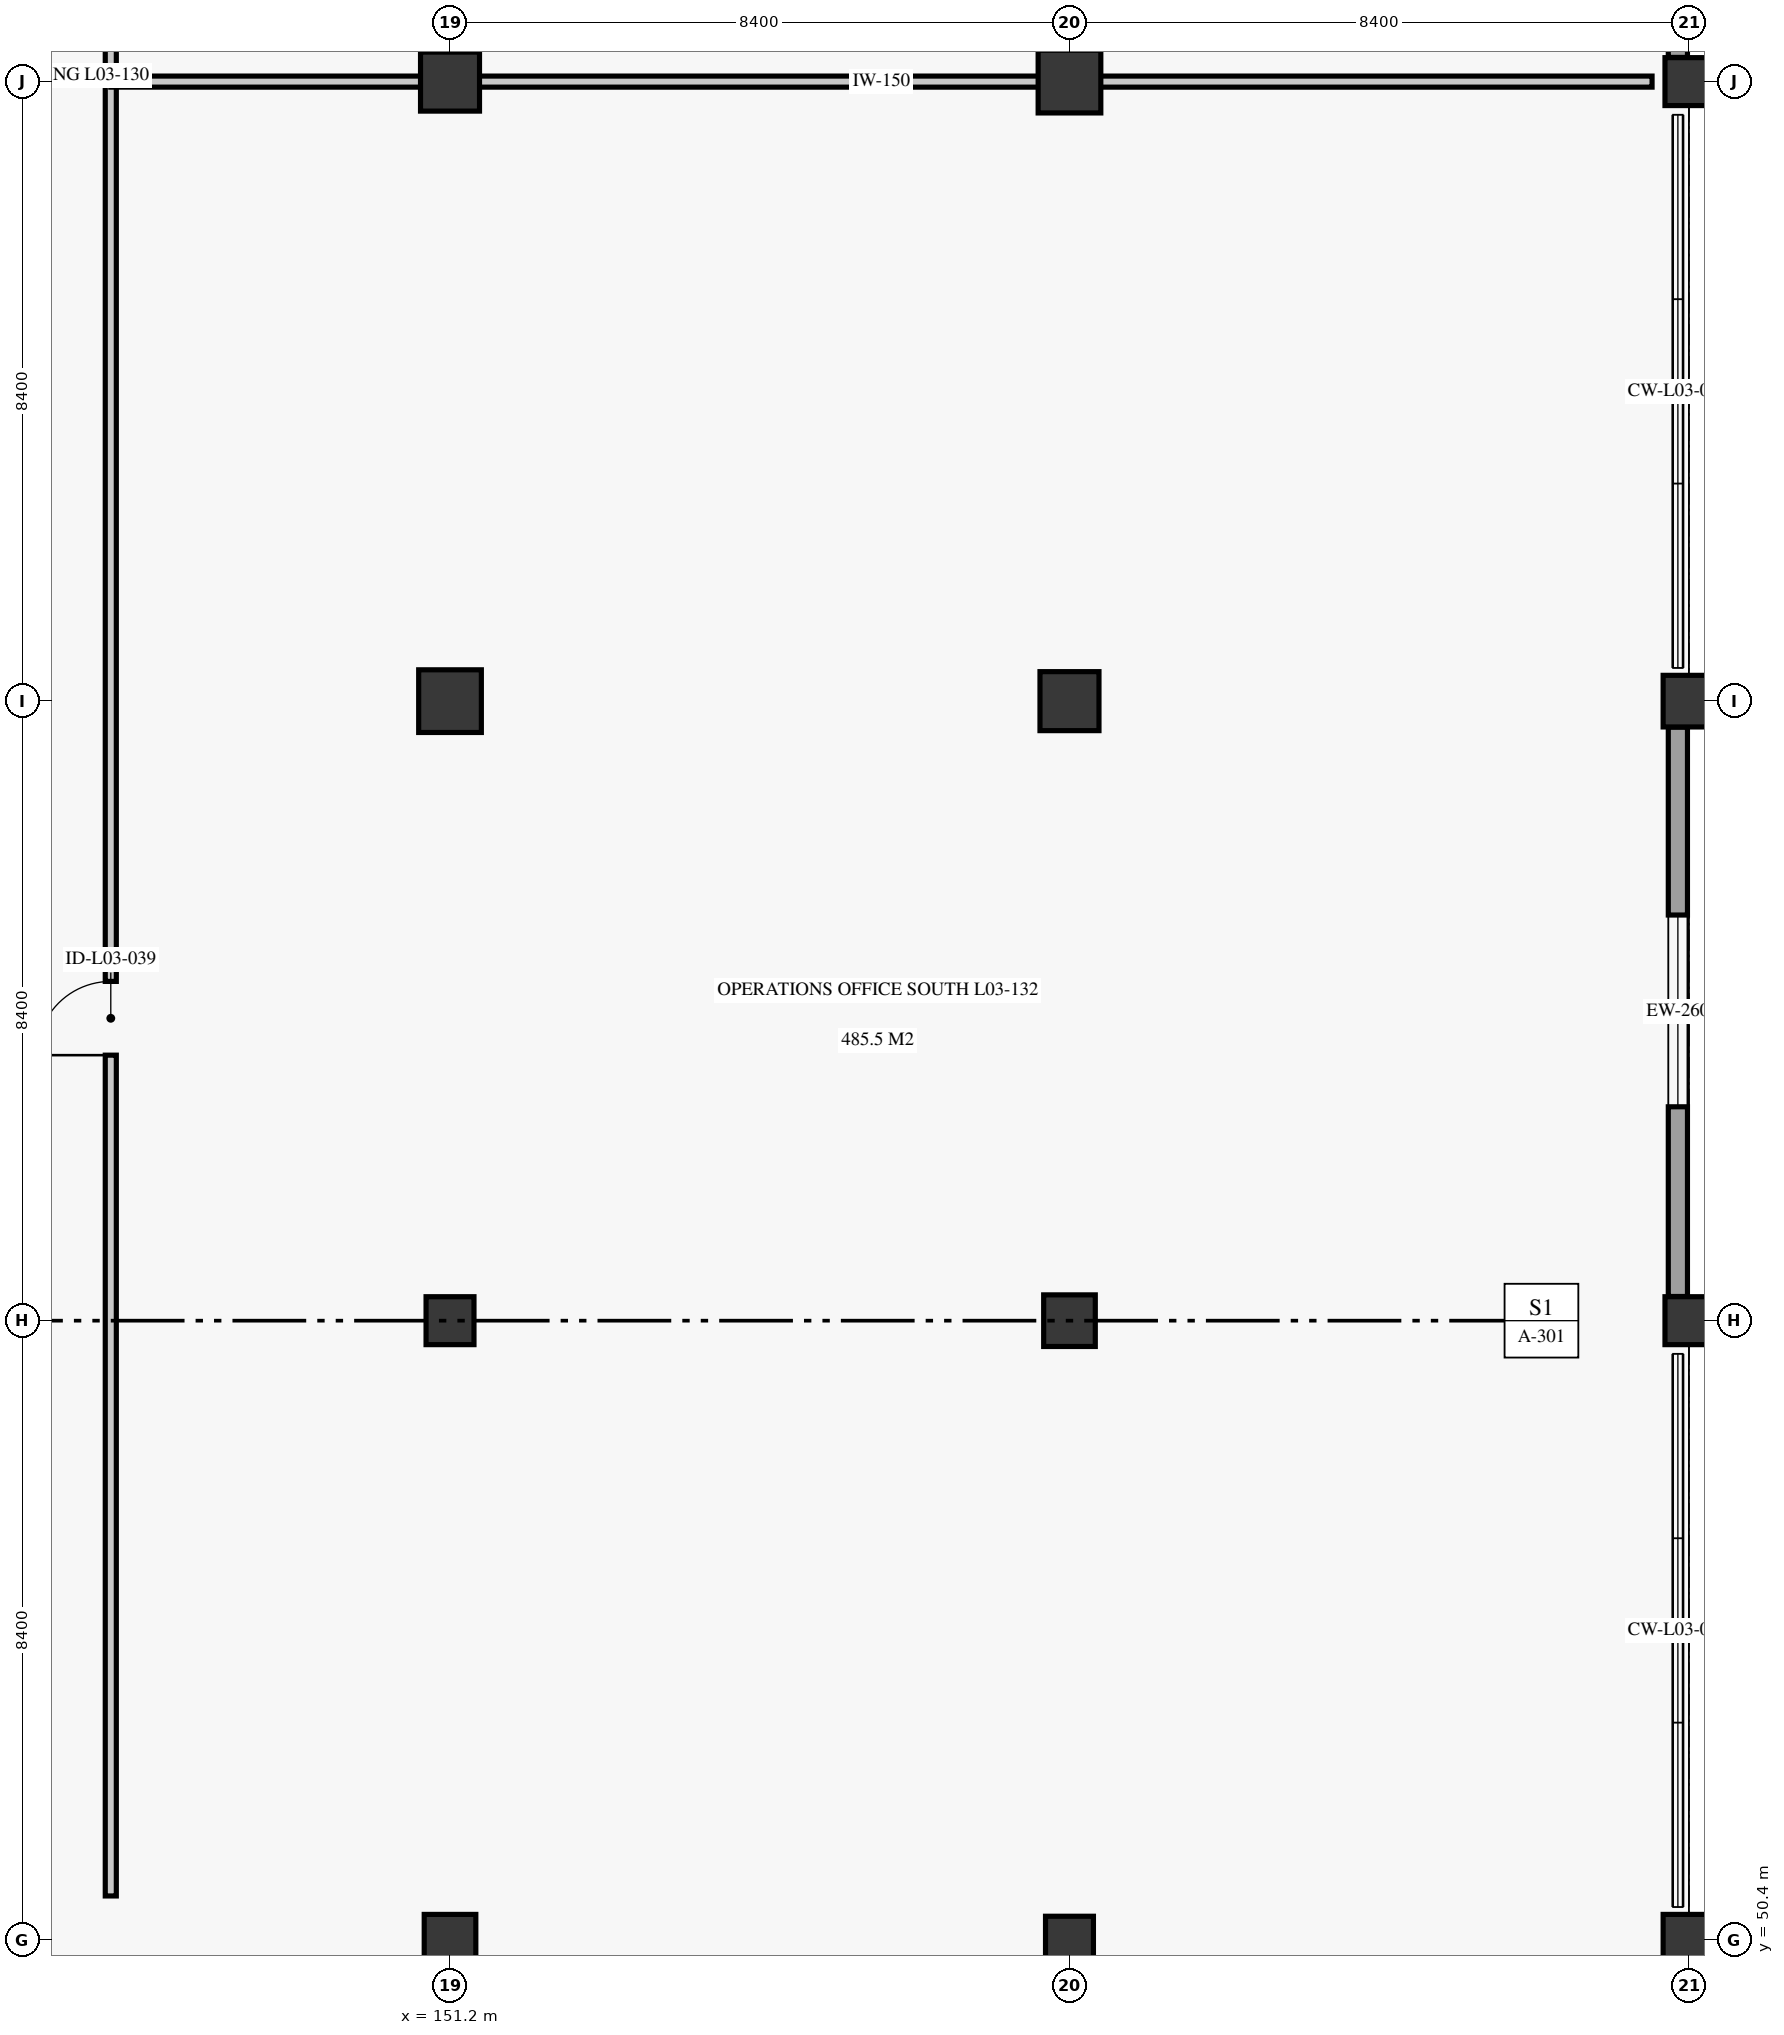
"""IFC4 building model, lengths in metres.
Left out: names, types, materials, properties, quantities, classifications, styles, units other than length and angle.
Written with IfcOpenShell. Run it as: python <this file> out.ifc"""

import sys

from ifc_helpers import new_model, si_unit, direction, frame, frame_2d, origin, origin_2d, place, context, subcontext, project, spatial, rectangle, extrude, element, fill, save


model = new_model("IFC4")
c1 = context("Model", 3, precision=1e-05, world=origin(), true_north=direction((0.0, 1.0)))
c2 = subcontext(c1, "Body", "Model", "MODEL_VIEW")
j1 = project(units=[si_unit("LENGTHUNIT", "METRE"), si_unit("PLANEANGLEUNIT", "RADIAN")], contexts=[c1])
p1 = place(None, origin())
s1 = spatial("IfcSite", under=j1, at=p1, CompositionType="ELEMENT")
p2 = place(p1, origin())
s2 = spatial("IfcBuilding", under=s1, at=p2, CompositionType="ELEMENT")
p3 = place(p2, frame((0.0, 0.0, 11.4)))
s3 = spatial("IfcBuildingStorey", under=s2, at=p3, CompositionType="ELEMENT", Elevation=11.4)
p4 = place(p3, frame((151.2, 50.4, 0.0), z_axis=(0.0, 0.0, 1.0), x_axis=(1.0, 0.0, 0.0)))
e1 = element("IfcColumn", 1, at=p4, inside=s3, PredefinedType="COLUMN", context=c2, shape_type="SweptSolid", body=[
    extrude(rectangle(XDim=0.7, YDim=0.7, at=origin_2d()), origin(), (0.0, 0.0, 1.0), 5.1),
])
p5 = place(p3, frame((151.2, 58.8, 0.0), z_axis=(0.0, 0.0, 1.0), x_axis=(1.0, 0.0, 0.0)))
e2 = element("IfcColumn", 2, at=p5, inside=s3, PredefinedType="COLUMN", context=c2, shape_type="SweptSolid", body=[
    extrude(rectangle(XDim=0.65, YDim=0.65, at=origin_2d()), origin(), (0.0, 0.0, 1.0), 5.1),
])
p6 = place(p3, frame((151.2, 67.2, 0.0), z_axis=(0.0, 0.0, 1.0), x_axis=(1.0, 0.0, 0.0)))
e3 = element("IfcColumn", 3, at=p6, inside=s3, PredefinedType="COLUMN", context=c2, shape_type="SweptSolid", body=[
    extrude(rectangle(XDim=0.85, YDim=0.85, at=origin_2d()), origin(), (0.0, 0.0, 1.0), 5.1),
])
p7 = place(p3, frame((151.2, 75.6, 0.0), z_axis=(0.0, 0.0, 1.0), x_axis=(1.0, 0.0, 0.0)))
e4 = element("IfcColumn", 4, at=p7, inside=s3, PredefinedType="COLUMN", context=c2, shape_type="SweptSolid", body=[
    extrude(rectangle(XDim=0.8, YDim=0.8, at=origin_2d()), origin(), (0.0, 0.0, 1.0), 5.1),
])
p8 = place(p3, frame((159.6, 50.4, 0.0), z_axis=(0.0, 0.0, 1.0), x_axis=(1.0, 0.0, 0.0)))
e5 = element("IfcColumn", 5, at=p8, inside=s3, PredefinedType="COLUMN", context=c2, shape_type="SweptSolid", body=[
    extrude(rectangle(XDim=0.65, YDim=0.65, at=origin_2d()), origin(), (0.0, 0.0, 1.0), 5.1),
])
p9 = place(p3, frame((159.6, 58.8, 0.0), z_axis=(0.0, 0.0, 1.0), x_axis=(1.0, 0.0, 0.0)))
e6 = element("IfcColumn", 6, at=p9, inside=s3, PredefinedType="COLUMN", context=c2, shape_type="SweptSolid", body=[
    extrude(rectangle(XDim=0.7, YDim=0.7, at=origin_2d()), origin(), (0.0, 0.0, 1.0), 5.1),
])
p10 = place(p3, frame((159.6, 67.2, 0.0), z_axis=(0.0, 0.0, 1.0), x_axis=(1.0, 0.0, 0.0)))
e7 = element("IfcColumn", 7, at=p10, inside=s3, PredefinedType="COLUMN", context=c2, shape_type="SweptSolid", body=[
    extrude(rectangle(XDim=0.8, YDim=0.8, at=origin_2d()), origin(), (0.0, 0.0, 1.0), 5.1),
])
p11 = place(p3, frame((159.6, 75.6, 0.0), z_axis=(0.0, 0.0, 1.0), x_axis=(1.0, 0.0, 0.0)))
e8 = element("IfcColumn", 8, at=p11, inside=s3, PredefinedType="COLUMN", context=c2, shape_type="SweptSolid", body=[
    extrude(rectangle(XDim=0.85, YDim=0.85, at=origin_2d()), origin(), (0.0, 0.0, 1.0), 5.1),
])
p12 = place(p3, frame((168.0, 50.4, 0.0), z_axis=(0.0, 0.0, 1.0), x_axis=(1.0, 0.0, 0.0)))
e9 = element("IfcColumn", 9, at=p12, inside=s3, PredefinedType="COLUMN", context=c2, shape_type="SweptSolid", body=[
    extrude(rectangle(XDim=0.7, YDim=0.7, at=origin_2d()), origin(), (0.0, 0.0, 1.0), 5.1),
])
p13 = place(p3, frame((168.0, 58.8, 0.0), z_axis=(0.0, 0.0, 1.0), x_axis=(1.0, 0.0, 0.0)))
e10 = element("IfcColumn", 10, at=p13, inside=s3, PredefinedType="COLUMN", context=c2, shape_type="SweptSolid", body=[
    extrude(rectangle(XDim=0.65, YDim=0.65, at=origin_2d()), origin(), (0.0, 0.0, 1.0), 5.1),
])
p14 = place(p3, frame((168.0, 67.2, 0.0), z_axis=(0.0, 0.0, 1.0), x_axis=(1.0, 0.0, 0.0)))
e11 = element("IfcColumn", 11, at=p14, inside=s3, PredefinedType="COLUMN", context=c2, shape_type="SweptSolid", body=[
    extrude(rectangle(XDim=0.7, YDim=0.7, at=origin_2d()), origin(), (0.0, 0.0, 1.0), 5.1),
])
p15 = place(p3, frame((168.0, 75.6, 0.0), z_axis=(0.0, 0.0, 1.0), x_axis=(1.0, 0.0, 0.0)))
e12 = element("IfcColumn", 12, at=p15, inside=s3, PredefinedType="COLUMN", context=c2, shape_type="SweptSolid", body=[
    extrude(rectangle(XDim=0.65, YDim=0.65, at=origin_2d()), origin(), (0.0, 0.0, 1.0), 5.1),
])
p16 = place(p3, frame((167.85, 59.128, 0.0), z_axis=(0.0, 0.0, 1.0), x_axis=(0.0, 1.0, 0.0)))
e13 = element("IfcWall", 13, at=p16, inside=s3, PredefinedType="SOLIDWALL", context=c2, shape_type="SweptSolid", body=[
    extrude(rectangle(XDim=7.72, YDim=0.26, at=frame_2d((3.86, 0.0))), origin(), (0.0, 0.0, 1.0), 4.38),
])
p17 = place(p16, frame((2.572, 0.0, 1.0)))
e14 = element("IfcOpeningElement", 14, at=p17, cuts=e13, PredefinedType="OPENING", context=c2, shape_type="SweptSolid", body=[
    extrude(rectangle(XDim=2.6, YDim=2.1, at=frame_2d((1.3, 1.05))), frame((0.0, 0.14, 0.0), z_axis=(0.0, -1.0, 0.0), x_axis=(1.0, 0.0, 0.0)), (0.0, 0.0, 1.0), 0.28),
])
p18 = place(p3, frame((167.85, 75.928, 0.0), z_axis=(0.0, 0.0, 1.0), x_axis=(0.0, 1.0, 0.0)))
e15 = element("IfcWall", 15, at=p18, inside=s3, PredefinedType="SOLIDWALL", context=c2, shape_type="SweptSolid", body=[
    extrude(rectangle(XDim=7.72, YDim=0.26, at=frame_2d((3.86, 0.0))), origin(), (0.0, 0.0, 1.0), 4.38),
])
p19 = place(p18, frame((2.572, 0.0, 1.0)))
e16 = element("IfcOpeningElement", 16, at=p19, cuts=e15, PredefinedType="OPENING", context=c2, shape_type="SweptSolid", body=[
    extrude(rectangle(XDim=2.6, YDim=2.1, at=frame_2d((1.3, 1.05))), frame((0.0, 0.14, 0.0), z_axis=(0.0, -1.0, 0.0), x_axis=(1.0, 0.0, 0.0)), (0.0, 0.0, 1.0), 0.28),
])
p20 = place(p3, frame((146.6, 51.0, 0.0), z_axis=(0.0, 0.0, 1.0), x_axis=(0.0, 1.0, 0.0)))
e17 = element("IfcWall", 17, at=p20, inside=s3, PredefinedType="PARTITIONING", context=c2, shape_type="SweptSolid", body=[
    extrude(rectangle(XDim=49.0, YDim=0.15, at=frame_2d((24.5, 0.0))), origin(), (0.0, 0.0, 1.0), 4.72),
])
p21 = place(p20, frame((11.4, 0.0, 0.0)))
e18 = element("IfcOpeningElement", 18, at=p21, cuts=e17, PredefinedType="OPENING", context=c2, shape_type="SweptSolid", body=[
    extrude(rectangle(XDim=1.0, YDim=2.1, at=frame_2d((0.5, 1.05))), frame((0.0, 0.085, 0.0), z_axis=(0.0, -1.0, 0.0), x_axis=(1.0, 0.0, 0.0)), (0.0, 0.0, 1.0), 0.17),
])
p22 = place(p20, frame((36.6, 0.0, 0.0)))
e19 = element("IfcOpeningElement", 19, at=p22, cuts=e17, PredefinedType="OPENING", context=c2, shape_type="SweptSolid", body=[
    extrude(rectangle(XDim=1.0, YDim=2.1, at=frame_2d((0.5, 1.05))), frame((0.0, 0.085, 0.0), z_axis=(0.0, -1.0, 0.0), x_axis=(1.0, 0.0, 0.0)), (0.0, 0.0, 1.0), 0.17),
])
p23 = place(p3, frame((146.6, 75.6, 0.0), z_axis=(0.0, 0.0, 1.0), x_axis=(1.0, 0.0, 0.0)))
e20 = element("IfcWall", 20, at=p23, inside=s3, PredefinedType="PARTITIONING", context=c2, shape_type="SweptSolid", body=[
    extrude(rectangle(XDim=20.9, YDim=0.15, at=frame_2d((10.45, 0.0))), origin(), (0.0, 0.0, 1.0), 4.72),
])
p24 = place(p17, origin())
e21 = element("IfcWindow", 21, at=p24, inside=s3, PartitioningType="SINGLE_PANEL", PredefinedType="WINDOW", context=c2, shape_type="SweptSolid", body=[
    extrude(rectangle(XDim=2.6, YDim=2.1, at=frame_2d((1.3, 1.05))), frame((0.0, 0.03, 0.0), z_axis=(0.0, -1.0, 0.0), x_axis=(1.0, 0.0, 0.0)), (0.0, 0.0, 1.0), 0.06),
])
fill(e14, e21)
p25 = place(p21, origin())
e22 = element("IfcDoor", 22, at=p25, inside=s3, OperationType="SINGLE_SWING_LEFT", PredefinedType="DOOR", context=c2, shape_type="SweptSolid", body=[
    extrude(rectangle(XDim=1.0, YDim=2.1, at=frame_2d((0.5, 1.05))), frame((0.0, 0.025, 0.0), z_axis=(0.0, -1.0, 0.0), x_axis=(1.0, 0.0, 0.0)), (0.0, 0.0, 1.0), 0.05),
])
fill(e18, e22)
save(model, sys.argv[1])
